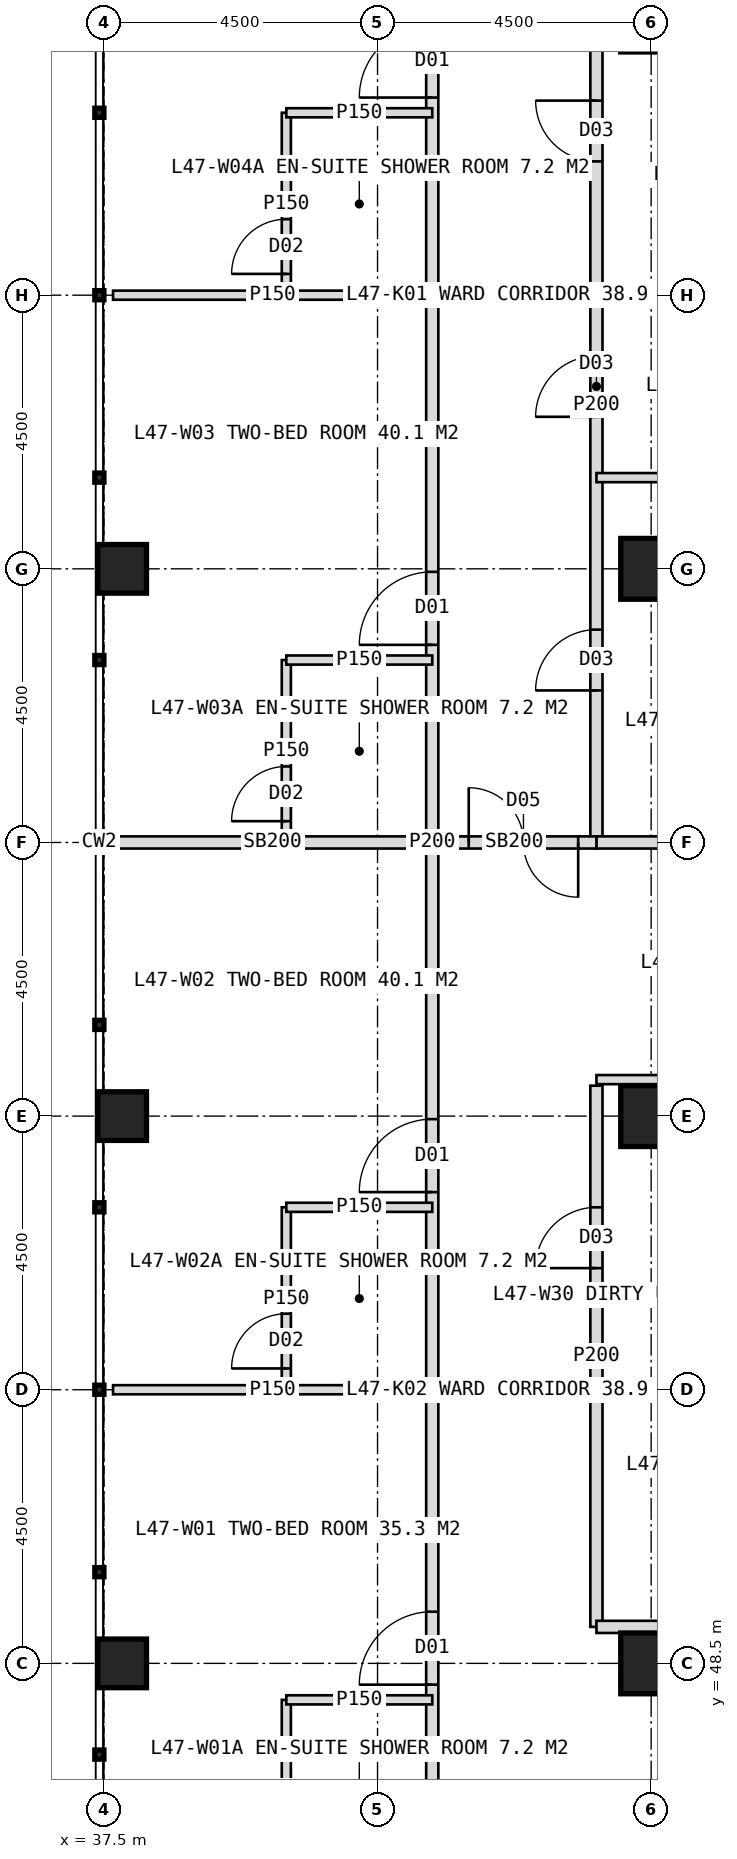
"""IFC4 building model, lengths in metres.
Left out: names, types, materials, properties, quantities, classifications, styles, units other than length and angle.
Written with IfcOpenShell. Run it as: python <this file> out.ifc"""

import sys

from ifc_helpers import new_model, si_unit, direction, frame, frame_2d, origin, origin_2d, place, context, subcontext, project, spatial, rectangle, hollow_rectangle, extrude, element, fill, save


model = new_model("IFC4")
c1 = context("Model", 3, precision=1e-05, world=origin(), true_north=direction((0.0, 1.0)))
c2 = subcontext(c1, "Body", "Model", "MODEL_VIEW")
j1 = project(units=[si_unit("LENGTHUNIT", "METRE"), si_unit("PLANEANGLEUNIT", "RADIAN")], contexts=[c1])
p1 = place(None, origin())
s1 = spatial("IfcSite", under=j1, at=p1, CompositionType="ELEMENT")
p2 = place(p1, origin())
s2 = spatial("IfcBuilding", under=s1, at=p2, CompositionType="ELEMENT")
p3 = place(p2, frame((0.0, 0.0, 197.0)))
s3 = spatial("IfcBuildingStorey", under=s2, at=p3, CompositionType="ELEMENT", Elevation=197.0)
for number, where, z_axis, x_axis in (
    (1, (46.5, 48.5, 0.0), (0.0, 0.0, 1.0), (1.0, 0.0, 0.0)),
    (2, (46.5, 57.5, 0.0), (0.0, 0.0, 1.0), (1.0, 0.0, 0.0)),
    (3, (46.5, 66.5, 0.0), (0.0, 0.0, 1.0), (1.0, 0.0, 0.0)),
):
    element("IfcColumn", number, at=place(p3, frame(where, z_axis=z_axis, x_axis=x_axis)), inside=s3, PredefinedType="COLUMN", context=c2, shape_type="SweptSolid", body=[
        extrude(hollow_rectangle(XDim=1.0, YDim=1.0, WallThickness=0.1, at=origin_2d()), origin(), (0.0, 0.0, 1.0), 4.0),
    ])
for number, where, z_axis, x_axis in (
    (4, (37.8, 48.5, 0.0), (0.0, 0.0, 1.0), (1.0, 0.0, 0.0)),
    (5, (37.8, 57.5, 0.0), (0.0, 0.0, 1.0), (1.0, 0.0, 0.0)),
    (6, (37.8, 66.5, 0.0), (0.0, 0.0, 1.0), (1.0, 0.0, 0.0)),
):
    element("IfcColumn", number, at=place(p3, frame(where, z_axis=z_axis, x_axis=x_axis)), inside=s3, PredefinedType="COLUMN", context=c2, shape_type="SweptSolid", body=[
        extrude(hollow_rectangle(XDim=0.8, YDim=0.8, WallThickness=0.08, at=origin_2d()), origin(), (0.0, 0.0, 1.0), 4.0),
    ])
p4 = place(p3, frame((42.9, 53.0, 0.0), z_axis=(0.0, 0.0, 1.0), x_axis=(-1.0, 0.0, 0.0)))
e7 = element("IfcWall", 7, at=p4, inside=s3, PredefinedType="PARTITIONING", context=c2, shape_type="SweptSolid", body=[
    extrude(rectangle(XDim=5.25, YDim=0.15, at=frame_2d((2.625, 0.0))), origin(), (0.0, 0.0, 1.0), 3.75),
])
p5 = place(p3, frame((42.9, 62.0, 0.0), z_axis=(0.0, 0.0, 1.0), x_axis=(-1.0, 0.0, 0.0)))
e8 = element("IfcWall", 8, at=p5, inside=s3, PredefinedType="SOLIDWALL", context=c2, shape_type="SweptSolid", body=[
    extrude(rectangle(XDim=5.25, YDim=0.2, at=frame_2d((2.625, 0.0))), origin(), (0.0, 0.0, 1.0), 2.95),
])
p6 = place(p3, frame((42.9, 71.0, 0.0), z_axis=(0.0, 0.0, 1.0), x_axis=(-1.0, 0.0, 0.0)))
e9 = element("IfcWall", 9, at=p6, inside=s3, PredefinedType="PARTITIONING", context=c2, shape_type="SweptSolid", body=[
    extrude(rectangle(XDim=5.25, YDim=0.15, at=frame_2d((2.625, 0.0))), origin(), (0.0, 0.0, 1.0), 3.75),
])
p7 = place(p3, frame((42.9, 44.9, 0.0), z_axis=(0.0, 0.0, 1.0), x_axis=(0.0, 1.0, 0.0)))
e10 = element("IfcWall", 10, at=p7, inside=s3, PredefinedType="PARTITIONING", context=c2, shape_type="SweptSolid", body=[
    extrude(rectangle(XDim=34.2, YDim=0.2, at=frame_2d((17.1, 0.0))), origin(), (0.0, 0.0, 1.0), 3.75),
])
p8 = place(p7, frame((3.25, 0.0, 0.0)))
e11 = element("IfcOpeningElement", 11, at=p8, cuts=e10, PredefinedType="OPENING", context=c2, shape_type="SweptSolid", body=[
    extrude(rectangle(XDim=1.2, YDim=2.2, at=frame_2d((0.6, 1.1))), frame((0.0, 0.11, 0.0), z_axis=(0.0, -1.0, 0.0), x_axis=(1.0, 0.0, 0.0)), (0.0, 0.0, 1.0), 0.22),
])
p9 = place(p7, frame((11.35, 0.0, 0.0)))
e12 = element("IfcOpeningElement", 12, at=p9, cuts=e10, PredefinedType="OPENING", context=c2, shape_type="SweptSolid", body=[
    extrude(rectangle(XDim=1.2, YDim=2.2, at=frame_2d((0.6, 1.1))), frame((0.0, 0.11, 0.0), z_axis=(0.0, -1.0, 0.0), x_axis=(1.0, 0.0, 0.0)), (0.0, 0.0, 1.0), 0.22),
])
p10 = place(p7, frame((20.35, 0.0, 0.0)))
e13 = element("IfcOpeningElement", 13, at=p10, cuts=e10, PredefinedType="OPENING", context=c2, shape_type="SweptSolid", body=[
    extrude(rectangle(XDim=1.2, YDim=2.2, at=frame_2d((0.6, 1.1))), frame((0.0, 0.11, 0.0), z_axis=(0.0, -1.0, 0.0), x_axis=(1.0, 0.0, 0.0)), (0.0, 0.0, 1.0), 0.22),
])
p11 = place(p7, frame((29.35, 0.0, 0.0)))
e14 = element("IfcOpeningElement", 14, at=p11, cuts=e10, PredefinedType="OPENING", context=c2, shape_type="SweptSolid", body=[
    extrude(rectangle(XDim=1.2, YDim=2.2, at=frame_2d((0.6, 1.1))), frame((0.0, 0.11, 0.0), z_axis=(0.0, -1.0, 0.0), x_axis=(1.0, 0.0, 0.0)), (0.0, 0.0, 1.0), 0.22),
])
p12 = place(p3, frame((40.5, 44.9, 0.0), z_axis=(0.0, 0.0, 1.0), x_axis=(0.0, 1.0, 0.0)))
e15 = element("IfcWall", 15, at=p12, inside=s3, PredefinedType="PARTITIONING", context=c2, shape_type="SweptSolid", body=[
    extrude(rectangle(XDim=3.0, YDim=0.15, at=frame_2d((1.5, 0.0))), origin(), (0.0, 0.0, 1.0), 3.75),
])
p13 = place(p12, frame((0.35, 0.0, 0.0)))
e16 = element("IfcOpeningElement", 16, at=p13, cuts=e15, PredefinedType="OPENING", context=c2, shape_type="SweptSolid", body=[
    extrude(rectangle(XDim=0.9, YDim=2.1, at=frame_2d((0.45, 1.05))), frame((0.0, 0.085, 0.0), z_axis=(0.0, -1.0, 0.0), x_axis=(1.0, 0.0, 0.0)), (0.0, 0.0, 1.0), 0.17),
])
p14 = place(p3, frame((42.9, 47.9, 0.0), z_axis=(0.0, 0.0, 1.0), x_axis=(-1.0, 0.0, 0.0)))
e17 = element("IfcWall", 17, at=p14, inside=s3, PredefinedType="PARTITIONING", context=c2, shape_type="SweptSolid", body=[
    extrude(rectangle(XDim=2.4, YDim=0.15, at=frame_2d((1.2, 0.0))), origin(), (0.0, 0.0, 1.0), 3.75),
])
p15 = place(p3, frame((40.5, 53.0, 0.0), z_axis=(0.0, 0.0, 1.0), x_axis=(0.0, 1.0, 0.0)))
e18 = element("IfcWall", 18, at=p15, inside=s3, PredefinedType="PARTITIONING", context=c2, shape_type="SweptSolid", body=[
    extrude(rectangle(XDim=3.0, YDim=0.15, at=frame_2d((1.5, 0.0))), origin(), (0.0, 0.0, 1.0), 3.75),
])
p16 = place(p15, frame((0.35, 0.0, 0.0)))
e19 = element("IfcOpeningElement", 19, at=p16, cuts=e18, PredefinedType="OPENING", context=c2, shape_type="SweptSolid", body=[
    extrude(rectangle(XDim=0.9, YDim=2.1, at=frame_2d((0.45, 1.05))), frame((0.0, 0.085, 0.0), z_axis=(0.0, -1.0, 0.0), x_axis=(1.0, 0.0, 0.0)), (0.0, 0.0, 1.0), 0.17),
])
p17 = place(p3, frame((42.9, 56.0, 0.0), z_axis=(0.0, 0.0, 1.0), x_axis=(-1.0, 0.0, 0.0)))
e20 = element("IfcWall", 20, at=p17, inside=s3, PredefinedType="PARTITIONING", context=c2, shape_type="SweptSolid", body=[
    extrude(rectangle(XDim=2.4, YDim=0.15, at=frame_2d((1.2, 0.0))), origin(), (0.0, 0.0, 1.0), 3.75),
])
p18 = place(p3, frame((40.5, 62.0, 0.0), z_axis=(0.0, 0.0, 1.0), x_axis=(0.0, 1.0, 0.0)))
e21 = element("IfcWall", 21, at=p18, inside=s3, PredefinedType="PARTITIONING", context=c2, shape_type="SweptSolid", body=[
    extrude(rectangle(XDim=3.0, YDim=0.15, at=frame_2d((1.5, 0.0))), origin(), (0.0, 0.0, 1.0), 3.75),
])
p19 = place(p18, frame((0.35, 0.0, 0.0)))
e22 = element("IfcOpeningElement", 22, at=p19, cuts=e21, PredefinedType="OPENING", context=c2, shape_type="SweptSolid", body=[
    extrude(rectangle(XDim=0.9, YDim=2.1, at=frame_2d((0.45, 1.05))), frame((0.0, 0.085, 0.0), z_axis=(0.0, -1.0, 0.0), x_axis=(1.0, 0.0, 0.0)), (0.0, 0.0, 1.0), 0.17),
])
p20 = place(p3, frame((42.9, 65.0, 0.0), z_axis=(0.0, 0.0, 1.0), x_axis=(-1.0, 0.0, 0.0)))
e23 = element("IfcWall", 23, at=p20, inside=s3, PredefinedType="PARTITIONING", context=c2, shape_type="SweptSolid", body=[
    extrude(rectangle(XDim=2.4, YDim=0.15, at=frame_2d((1.2, 0.0))), origin(), (0.0, 0.0, 1.0), 3.75),
])
p21 = place(p3, frame((40.5, 71.0, 0.0), z_axis=(0.0, 0.0, 1.0), x_axis=(0.0, 1.0, 0.0)))
e24 = element("IfcWall", 24, at=p21, inside=s3, PredefinedType="PARTITIONING", context=c2, shape_type="SweptSolid", body=[
    extrude(rectangle(XDim=3.0, YDim=0.15, at=frame_2d((1.5, 0.0))), origin(), (0.0, 0.0, 1.0), 3.75),
])
p22 = place(p21, frame((0.35, 0.0, 0.0)))
e25 = element("IfcOpeningElement", 25, at=p22, cuts=e24, PredefinedType="OPENING", context=c2, shape_type="SweptSolid", body=[
    extrude(rectangle(XDim=0.9, YDim=2.1, at=frame_2d((0.45, 1.05))), frame((0.0, 0.085, 0.0), z_axis=(0.0, -1.0, 0.0), x_axis=(1.0, 0.0, 0.0)), (0.0, 0.0, 1.0), 0.17),
])
p23 = place(p3, frame((42.9, 74.0, 0.0), z_axis=(0.0, 0.0, 1.0), x_axis=(-1.0, 0.0, 0.0)))
e26 = element("IfcWall", 26, at=p23, inside=s3, PredefinedType="PARTITIONING", context=c2, shape_type="SweptSolid", body=[
    extrude(rectangle(XDim=2.4, YDim=0.15, at=frame_2d((1.2, 0.0))), origin(), (0.0, 0.0, 1.0), 3.75),
])
p24 = place(p3, frame((51.0, 53.0, 0.0), z_axis=(0.0, 0.0, 1.0), x_axis=(-1.0, 0.0, 0.0)))
e27 = element("IfcWall", 27, at=p24, inside=s3, PredefinedType="PARTITIONING", context=c2, shape_type="SweptSolid", body=[
    extrude(rectangle(XDim=5.4, YDim=0.15, at=frame_2d((2.7, 0.0))), origin(), (0.0, 0.0, 1.0), 3.75),
])
p25 = place(p3, frame((45.6, 49.1, 0.0), z_axis=(0.0, 0.0, 1.0), x_axis=(0.0, 1.0, 0.0)))
e28 = element("IfcWall", 28, at=p25, inside=s3, PredefinedType="PARTITIONING", context=c2, shape_type="SweptSolid", body=[
    extrude(rectangle(XDim=8.9, YDim=0.2, at=frame_2d((4.45, 0.0))), origin(), (0.0, 0.0, 1.0), 3.75),
])
p26 = place(p25, frame((5.9, 0.0, 0.0)))
e29 = element("IfcOpeningElement", 29, at=p26, cuts=e28, PredefinedType="OPENING", context=c2, shape_type="SweptSolid", body=[
    extrude(rectangle(XDim=1.0, YDim=2.1, at=frame_2d((0.5, 1.05))), frame((0.0, 0.11, 0.0), z_axis=(0.0, -1.0, 0.0), x_axis=(1.0, 0.0, 0.0)), (0.0, 0.0, 1.0), 0.22),
])
p27 = place(p3, frame((45.6, 62.0, 0.0), z_axis=(0.0, 0.0, 1.0), x_axis=(0.0, 1.0, 0.0)))
e30 = element("IfcWall", 30, at=p27, inside=s3, PredefinedType="PARTITIONING", context=c2, shape_type="SweptSolid", body=[
    extrude(rectangle(XDim=14.4, YDim=0.2, at=frame_2d((7.2, 0.0))), origin(), (0.0, 0.0, 1.0), 3.75),
])
p28 = place(p27, frame((2.5, 0.0, 0.0)))
e31 = element("IfcOpeningElement", 31, at=p28, cuts=e30, PredefinedType="OPENING", context=c2, shape_type="SweptSolid", body=[
    extrude(rectangle(XDim=1.0, YDim=2.1, at=frame_2d((0.5, 1.05))), frame((0.0, 0.11, 0.0), z_axis=(0.0, -1.0, 0.0), x_axis=(1.0, 0.0, 0.0)), (0.0, 0.0, 1.0), 0.22),
])
p29 = place(p27, frame((7.0, 0.0, 0.0)))
e32 = element("IfcOpeningElement", 32, at=p29, cuts=e30, PredefinedType="OPENING", context=c2, shape_type="SweptSolid", body=[
    extrude(rectangle(XDim=1.0, YDim=2.1, at=frame_2d((0.5, 1.05))), frame((0.0, 0.11, 0.0), z_axis=(0.0, -1.0, 0.0), x_axis=(1.0, 0.0, 0.0)), (0.0, 0.0, 1.0), 0.22),
])
p30 = place(p27, frame((11.2, 0.0, 0.0)))
e33 = element("IfcOpeningElement", 33, at=p30, cuts=e30, PredefinedType="OPENING", context=c2, shape_type="SweptSolid", body=[
    extrude(rectangle(XDim=1.0, YDim=2.1, at=frame_2d((0.5, 1.05))), frame((0.0, 0.11, 0.0), z_axis=(0.0, -1.0, 0.0), x_axis=(1.0, 0.0, 0.0)), (0.0, 0.0, 1.0), 0.22),
])
p31 = place(p3, frame((51.0, 58.1, 0.0), z_axis=(0.0, 0.0, 1.0), x_axis=(-1.0, 0.0, 0.0)))
e34 = element("IfcWall", 34, at=p31, inside=s3, PredefinedType="PARTITIONING", context=c2, shape_type="SweptSolid", body=[
    extrude(rectangle(XDim=5.4, YDim=0.15, at=frame_2d((2.7, 0.0))), origin(), (0.0, 0.0, 1.0), 3.75),
])
p32 = place(p31, frame((0.6, 0.0, 0.0)))
e35 = element("IfcOpeningElement", 35, at=p32, cuts=e34, PredefinedType="OPENING", context=c2, shape_type="SweptSolid", body=[
    extrude(rectangle(XDim=0.9, YDim=2.1, at=frame_2d((0.45, 1.05))), frame((0.0, 0.085, 0.0), z_axis=(0.0, -1.0, 0.0), x_axis=(1.0, 0.0, 0.0)), (0.0, 0.0, 1.0), 0.17),
])
p33 = place(p3, frame((51.0, 62.0, 0.0), z_axis=(0.0, 0.0, 1.0), x_axis=(-1.0, 0.0, 0.0)))
e36 = element("IfcWall", 36, at=p33, inside=s3, PredefinedType="SOLIDWALL", context=c2, shape_type="SweptSolid", body=[
    extrude(rectangle(XDim=5.4, YDim=0.2, at=frame_2d((2.7, 0.0))), origin(), (0.0, 0.0, 1.0), 2.95),
])
for number, where, z_axis, x_axis in (
    (37, (51.0, 68.0, 0.0), (0.0, 0.0, 1.0), (-1.0, 0.0, 0.0)),
    (38, (51.0, 71.0, 0.0), (0.0, 0.0, 1.0), (-1.0, 0.0, 0.0)),
):
    element("IfcWall", number, at=place(p3, frame(where, z_axis=z_axis, x_axis=x_axis)), inside=s3, PredefinedType="PARTITIONING", context=c2, shape_type="SweptSolid", body=[
        extrude(rectangle(XDim=5.4, YDim=0.15, at=frame_2d((2.7, 0.0))), origin(), (0.0, 0.0, 1.0), 3.75),
    ])
p34 = place(p3, frame((57.75, 49.1, 0.0), z_axis=(0.0, 0.0, 1.0), x_axis=(-1.0, 0.0, 0.0)))
e39 = element("IfcWall", 39, at=p34, inside=s3, PredefinedType="PARTITIONING", context=c2, shape_type="SweptSolid", body=[
    extrude(rectangle(XDim=12.15, YDim=0.2, at=frame_2d((6.075, 0.0))), origin(), (0.0, 0.0, 1.0), 3.75),
])
p35 = place(p34, frame((4.3, 0.0, 0.0)))
e40 = element("IfcOpeningElement", 40, at=p35, cuts=e39, PredefinedType="OPENING", context=c2, shape_type="SweptSolid", body=[
    extrude(rectangle(XDim=1.0, YDim=2.1, at=frame_2d((0.5, 1.05))), frame((0.0, 0.11, 0.0), z_axis=(0.0, -1.0, 0.0), x_axis=(1.0, 0.0, 0.0)), (0.0, 0.0, 1.0), 0.22),
])
p36 = place(p34, frame((8.95, 0.0, 0.0)))
e41 = element("IfcOpeningElement", 41, at=p36, cuts=e39, PredefinedType="OPENING", context=c2, shape_type="SweptSolid", body=[
    extrude(rectangle(XDim=1.0, YDim=2.1, at=frame_2d((0.5, 1.05))), frame((0.0, 0.11, 0.0), z_axis=(0.0, -1.0, 0.0), x_axis=(1.0, 0.0, 0.0)), (0.0, 0.0, 1.0), 0.22),
])
p37 = place(p3, frame((45.6, 62.0, 0.0), z_axis=(0.0, 0.0, 1.0), x_axis=(-1.0, 0.0, 0.0)))
e42 = element("IfcWall", 42, at=p37, inside=s3, PredefinedType="SOLIDWALL", context=c2, shape_type="SweptSolid", body=[
    extrude(rectangle(XDim=2.7, YDim=0.2, at=frame_2d((1.35, 0.0))), origin(), (0.0, 0.0, 1.0), 2.95),
])
p38 = place(p37, frame((0.3, 0.0, 0.0)))
e43 = element("IfcOpeningElement", 43, at=p38, cuts=e42, PredefinedType="OPENING", context=c2, shape_type="SweptSolid", body=[
    extrude(rectangle(XDim=1.8, YDim=2.2, at=frame_2d((0.9, 1.1))), frame((0.0, 0.11, 0.0), z_axis=(0.0, -1.0, 0.0), x_axis=(1.0, 0.0, 0.0)), (0.0, 0.0, 1.0), 0.22),
])
p39 = place(p8, origin())
e44 = element("IfcDoor", 44, at=p39, inside=s3, OperationType="SINGLE_SWING_LEFT", PredefinedType="DOOR", context=c2, shape_type="SweptSolid", body=[
    extrude(rectangle(XDim=1.2, YDim=2.2, at=frame_2d((0.6, 1.1))), frame((0.0, 0.025, 0.0), z_axis=(0.0, -1.0, 0.0), x_axis=(1.0, 0.0, 0.0)), (0.0, 0.0, 1.0), 0.05),
])
fill(e11, e44)
p40 = place(p9, origin())
e45 = element("IfcDoor", 45, at=p40, inside=s3, OperationType="SINGLE_SWING_LEFT", PredefinedType="DOOR", context=c2, shape_type="SweptSolid", body=[
    extrude(rectangle(XDim=1.2, YDim=2.2, at=frame_2d((0.6, 1.1))), frame((0.0, 0.025, 0.0), z_axis=(0.0, -1.0, 0.0), x_axis=(1.0, 0.0, 0.0)), (0.0, 0.0, 1.0), 0.05),
])
fill(e12, e45)
p41 = place(p16, origin())
e46 = element("IfcDoor", 46, at=p41, inside=s3, OperationType="SINGLE_SWING_LEFT", PredefinedType="DOOR", context=c2, shape_type="SweptSolid", body=[
    extrude(rectangle(XDim=0.9, YDim=2.1, at=frame_2d((0.45, 1.05))), frame((0.0, 0.025, 0.0), z_axis=(0.0, -1.0, 0.0), x_axis=(1.0, 0.0, 0.0)), (0.0, 0.0, 1.0), 0.05),
])
fill(e19, e46)
p42 = place(p10, origin())
e47 = element("IfcDoor", 47, at=p42, inside=s3, OperationType="SINGLE_SWING_LEFT", PredefinedType="DOOR", context=c2, shape_type="SweptSolid", body=[
    extrude(rectangle(XDim=1.2, YDim=2.2, at=frame_2d((0.6, 1.1))), frame((0.0, 0.025, 0.0), z_axis=(0.0, -1.0, 0.0), x_axis=(1.0, 0.0, 0.0)), (0.0, 0.0, 1.0), 0.05),
])
fill(e13, e47)
p43 = place(p19, origin())
e48 = element("IfcDoor", 48, at=p43, inside=s3, OperationType="SINGLE_SWING_LEFT", PredefinedType="DOOR", context=c2, shape_type="SweptSolid", body=[
    extrude(rectangle(XDim=0.9, YDim=2.1, at=frame_2d((0.45, 1.05))), frame((0.0, 0.025, 0.0), z_axis=(0.0, -1.0, 0.0), x_axis=(1.0, 0.0, 0.0)), (0.0, 0.0, 1.0), 0.05),
])
fill(e22, e48)
p44 = place(p11, origin())
e49 = element("IfcDoor", 49, at=p44, inside=s3, OperationType="SINGLE_SWING_LEFT", PredefinedType="DOOR", context=c2, shape_type="SweptSolid", body=[
    extrude(rectangle(XDim=1.2, YDim=2.2, at=frame_2d((0.6, 1.1))), frame((0.0, 0.025, 0.0), z_axis=(0.0, -1.0, 0.0), x_axis=(1.0, 0.0, 0.0)), (0.0, 0.0, 1.0), 0.05),
])
fill(e14, e49)
p45 = place(p22, origin())
e50 = element("IfcDoor", 50, at=p45, inside=s3, OperationType="SINGLE_SWING_LEFT", PredefinedType="DOOR", context=c2, shape_type="SweptSolid", body=[
    extrude(rectangle(XDim=0.9, YDim=2.1, at=frame_2d((0.45, 1.05))), frame((0.0, 0.025, 0.0), z_axis=(0.0, -1.0, 0.0), x_axis=(1.0, 0.0, 0.0)), (0.0, 0.0, 1.0), 0.05),
])
fill(e25, e50)
p46 = place(p26, origin())
e51 = element("IfcDoor", 51, at=p46, inside=s3, OperationType="SINGLE_SWING_LEFT", PredefinedType="DOOR", context=c2, shape_type="SweptSolid", body=[
    extrude(rectangle(XDim=1.0, YDim=2.1, at=frame_2d((0.5, 1.05))), frame((0.0, 0.025, 0.0), z_axis=(0.0, -1.0, 0.0), x_axis=(1.0, 0.0, 0.0)), (0.0, 0.0, 1.0), 0.05),
])
fill(e29, e51)
p47 = place(p28, origin())
e52 = element("IfcDoor", 52, at=p47, inside=s3, OperationType="SINGLE_SWING_LEFT", PredefinedType="DOOR", context=c2, shape_type="SweptSolid", body=[
    extrude(rectangle(XDim=1.0, YDim=2.1, at=frame_2d((0.5, 1.05))), frame((0.0, 0.025, 0.0), z_axis=(0.0, -1.0, 0.0), x_axis=(1.0, 0.0, 0.0)), (0.0, 0.0, 1.0), 0.05),
])
fill(e31, e52)
p48 = place(p29, origin())
e53 = element("IfcDoor", 53, at=p48, inside=s3, OperationType="SINGLE_SWING_LEFT", PredefinedType="DOOR", context=c2, shape_type="SweptSolid", body=[
    extrude(rectangle(XDim=1.0, YDim=2.1, at=frame_2d((0.5, 1.05))), frame((0.0, 0.025, 0.0), z_axis=(0.0, -1.0, 0.0), x_axis=(1.0, 0.0, 0.0)), (0.0, 0.0, 1.0), 0.05),
])
fill(e32, e53)
p49 = place(p30, origin())
e54 = element("IfcDoor", 54, at=p49, inside=s3, OperationType="SINGLE_SWING_RIGHT", PredefinedType="DOOR", context=c2, shape_type="SweptSolid", body=[
    extrude(rectangle(XDim=1.0, YDim=2.1, at=frame_2d((0.5, 1.05))), frame((0.0, 0.025, 0.0), z_axis=(0.0, -1.0, 0.0), x_axis=(1.0, 0.0, 0.0)), (0.0, 0.0, 1.0), 0.05),
])
fill(e33, e54)
p50 = place(p38, origin())
e55 = element("IfcDoor", 55, at=p50, inside=s3, OperationType="DOUBLE_DOOR_DOUBLE_SWING", PredefinedType="DOOR", context=c2, shape_type="SweptSolid", body=[
    extrude(rectangle(XDim=1.8, YDim=2.2, at=frame_2d((0.9, 1.1))), frame((0.0, 0.025, 0.0), z_axis=(0.0, -1.0, 0.0), x_axis=(1.0, 0.0, 0.0)), (0.0, 0.0, 1.0), 0.05),
])
fill(e43, e55)
save(model, sys.argv[1])
